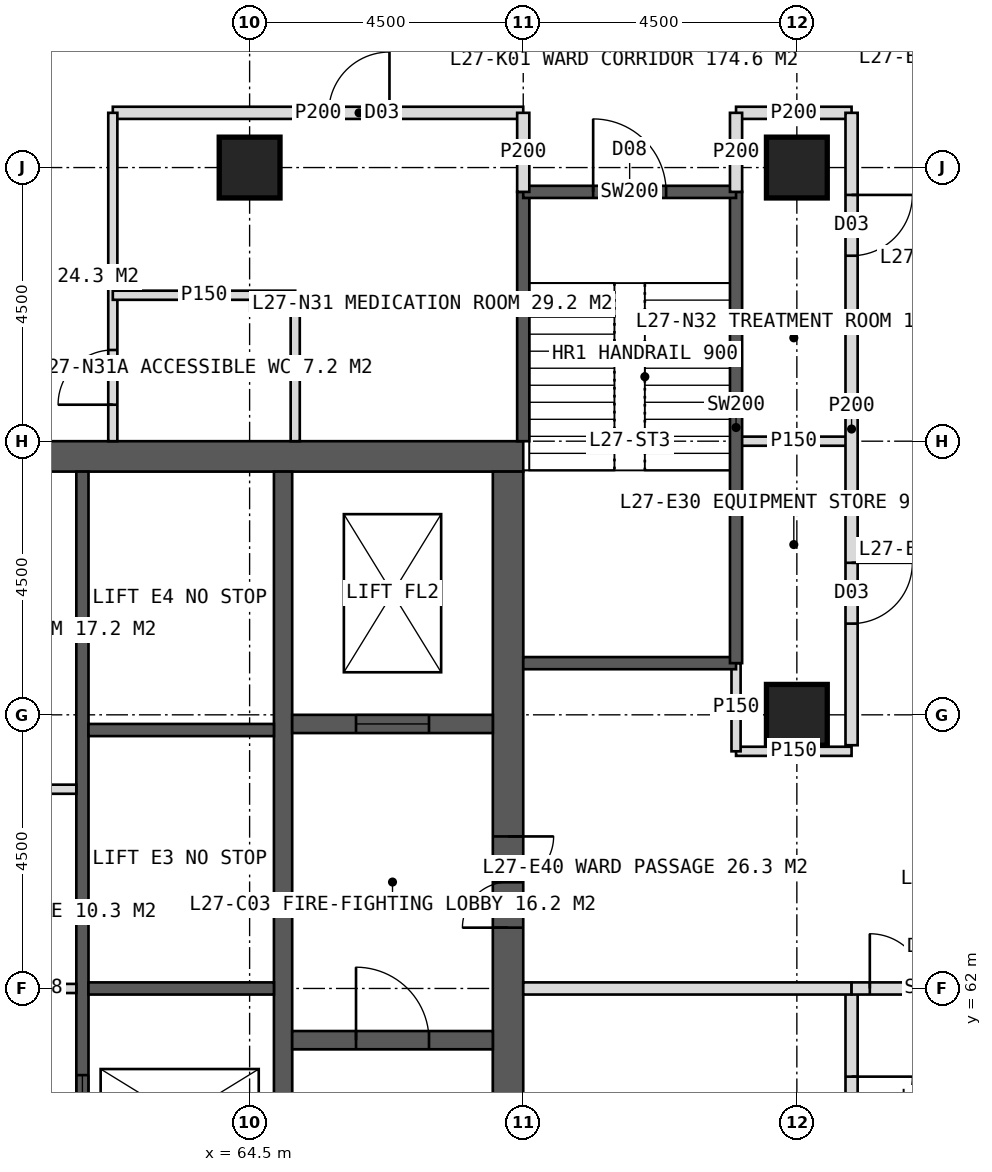
"""IFC4 building model, lengths in metres.
Left out: names, types, materials, properties, quantities, classifications, styles, units other than length and angle.
Written with IfcOpenShell. Run it as: python <this file> out.ifc"""

import sys

from ifc_helpers import new_model, si_unit, direction, frame, frame_2d, origin, origin_2d, place, context, subcontext, project, spatial, rectangle, hollow_rectangle, extrude, element, fill, save


model = new_model("IFC4")
c1 = context("Model", 3, precision=1e-05, world=origin(), true_north=direction((0.0, 1.0)))
c2 = subcontext(c1, "Body", "Model", "MODEL_VIEW")
j1 = project(units=[si_unit("LENGTHUNIT", "METRE"), si_unit("PLANEANGLEUNIT", "RADIAN")], contexts=[c1])
p1 = place(None, origin())
s1 = spatial("IfcSite", under=j1, at=p1, CompositionType="ELEMENT")
p2 = place(p1, origin())
s2 = spatial("IfcBuilding", under=s1, at=p2, CompositionType="ELEMENT")
p3 = place(p2, frame((0.0, 0.0, 116.0)))
s3 = spatial("IfcBuildingStorey", under=s2, at=p3, CompositionType="ELEMENT", Elevation=116.0)
p4 = place(p3, frame((51.0, 70.75, 0.0), z_axis=(0.0, 0.0, 1.0), x_axis=(1.0, 0.0, 0.0)))
e1 = element("IfcWall", 1, at=p4, inside=s3, PredefinedType="SHEAR", context=c2, shape_type="SweptSolid", body=[
    extrude(rectangle(XDim=18.0, YDim=0.5, at=frame_2d((9.0, 0.0))), origin(), (0.0, 0.0, 1.0), 4.0),
])
p5 = place(p4, frame((8.1, 0.0, 0.0)))
e2 = element("IfcOpeningElement", 2, at=p5, cuts=e1, PredefinedType="OPENING", context=c2, shape_type="SweptSolid", body=[
    extrude(rectangle(XDim=1.8, YDim=2.2, at=frame_2d((0.9, 1.1))), frame((0.0, 0.26, 0.0), z_axis=(0.0, -1.0, 0.0), x_axis=(1.0, 0.0, 0.0)), (0.0, 0.0, 1.0), 0.52),
])
p6 = place(p3, frame((68.75, 53.5, 0.0), z_axis=(0.0, 0.0, 1.0), x_axis=(0.0, 1.0, 0.0)))
e3 = element("IfcWall", 3, at=p6, inside=s3, PredefinedType="SHEAR", context=c2, shape_type="SweptSolid", body=[
    extrude(rectangle(XDim=17.0, YDim=0.5, at=frame_2d((8.5, 0.0))), origin(), (0.0, 0.0, 1.0), 4.0),
])
p7 = place(p6, frame((9.5, 0.0, 0.0)))
e4 = element("IfcOpeningElement", 4, at=p7, cuts=e3, PredefinedType="OPENING", context=c2, shape_type="SweptSolid", body=[
    extrude(rectangle(XDim=1.5, YDim=2.2, at=frame_2d((0.75, 1.1))), frame((0.0, 0.26, 0.0), z_axis=(0.0, -1.0, 0.0), x_axis=(1.0, 0.0, 0.0)), (0.0, 0.0, 1.0), 0.52),
])
p8 = place(p3, frame((65.05, 53.5, 0.0), z_axis=(0.0, 0.0, 1.0), x_axis=(0.0, 1.0, 0.0)))
e5 = element("IfcWall", 5, at=p8, inside=s3, PredefinedType="SHEAR", context=c2, shape_type="SweptSolid", body=[
    extrude(rectangle(XDim=17.0, YDim=0.3, at=frame_2d((8.5, 0.0))), origin(), (0.0, 0.0, 1.0), 4.0),
])
p9 = place(p3, frame((61.75, 53.5, 0.0), z_axis=(0.0, 0.0, 1.0), x_axis=(0.0, 1.0, 0.0)))
e6 = element("IfcWall", 6, at=p9, inside=s3, PredefinedType="SHEAR", context=c2, shape_type="SweptSolid", body=[
    extrude(rectangle(XDim=17.0, YDim=0.2, at=frame_2d((8.5, 0.0))), origin(), (0.0, 0.0, 1.0), 4.0),
])
p10 = place(p9, frame((1.375, 0.0, 0.0)))
e7 = element("IfcOpeningElement", 7, at=p10, cuts=e6, PredefinedType="OPENING", context=c2, shape_type="SweptSolid", body=[
    extrude(rectangle(XDim=1.4, YDim=2.2, at=frame_2d((0.7, 1.1))), frame((0.0, 0.11, 0.0), z_axis=(0.0, -1.0, 0.0), x_axis=(1.0, 0.0, 0.0)), (0.0, 0.0, 1.0), 0.22),
])
p11 = place(p9, frame((5.675, 0.0, 0.0)))
e8 = element("IfcOpeningElement", 8, at=p11, cuts=e6, PredefinedType="OPENING", context=c2, shape_type="SweptSolid", body=[
    extrude(rectangle(XDim=1.4, YDim=2.2, at=frame_2d((0.7, 1.1))), frame((0.0, 0.11, 0.0), z_axis=(0.0, -1.0, 0.0), x_axis=(1.0, 0.0, 0.0)), (0.0, 0.0, 1.0), 0.22),
])
for number, where, z_axis, x_axis in (
    (9, (61.85, 62.0, 0.0), (0.0, 0.0, 1.0), (1.0, 0.0, 0.0)),
    (10, (61.85, 66.25, 0.0), (0.0, 0.0, 1.0), (1.0, 0.0, 0.0)),
):
    element("IfcWall", number, at=place(p3, frame(where, z_axis=z_axis, x_axis=x_axis)), inside=s3, PredefinedType="SHEAR", context=c2, shape_type="SweptSolid", body=[
        extrude(rectangle(XDim=3.05, YDim=0.2, at=frame_2d((1.525, 0.0))), origin(), (0.0, 0.0, 1.0), 4.0),
    ])
p12 = place(p3, frame((65.2, 61.15, 0.0), z_axis=(0.0, 0.0, 1.0), x_axis=(1.0, 0.0, 0.0)))
e11 = element("IfcWall", 11, at=p12, inside=s3, PredefinedType="SHEAR", context=c2, shape_type="SweptSolid", body=[
    extrude(rectangle(XDim=3.3, YDim=0.3, at=frame_2d((1.65, 0.0))), origin(), (0.0, 0.0, 1.0), 4.0),
])
p13 = place(p12, frame((1.05, 0.0, 0.0)))
e12 = element("IfcOpeningElement", 12, at=p13, cuts=e11, PredefinedType="OPENING", context=c2, shape_type="SweptSolid", body=[
    extrude(rectangle(XDim=1.2, YDim=2.1, at=frame_2d((0.6, 1.05))), frame((0.0, 0.16, 0.0), z_axis=(0.0, -1.0, 0.0), x_axis=(1.0, 0.0, 0.0)), (0.0, 0.0, 1.0), 0.32),
])
p14 = place(p3, frame((65.2, 66.35, 0.0), z_axis=(0.0, 0.0, 1.0), x_axis=(1.0, 0.0, 0.0)))
e13 = element("IfcWall", 13, at=p14, inside=s3, PredefinedType="SHEAR", context=c2, shape_type="SweptSolid", body=[
    extrude(rectangle(XDim=3.3, YDim=0.3, at=frame_2d((1.65, 0.0))), origin(), (0.0, 0.0, 1.0), 4.0),
])
p15 = place(p14, frame((1.05, 0.0, 0.0)))
e14 = element("IfcOpeningElement", 14, at=p15, cuts=e13, PredefinedType="OPENING", context=c2, shape_type="SweptSolid", body=[
    extrude(rectangle(XDim=1.2, YDim=2.2, at=frame_2d((0.6, 1.1))), frame((0.0, 0.16, 0.0), z_axis=(0.0, -1.0, 0.0), x_axis=(1.0, 0.0, 0.0)), (0.0, 0.0, 1.0), 0.32),
])
for number, where, z_axis, x_axis in (
    (15, (73.5, 75.5, 0.0), (0.0, 0.0, 1.0), (1.0, 0.0, 0.0)),
    (16, (64.5, 75.5, 0.0), (0.0, 0.0, 1.0), (1.0, 0.0, 0.0)),
    (17, (73.5, 66.5, 0.0), (0.0, 0.0, 1.0), (1.0, 0.0, 0.0)),
):
    element("IfcColumn", number, at=place(p3, frame(where, z_axis=z_axis, x_axis=x_axis)), inside=s3, PredefinedType="COLUMN", context=c2, shape_type="SweptSolid", body=[
        extrude(hollow_rectangle(XDim=1.0, YDim=1.0, WallThickness=0.1, at=origin_2d()), origin(), (0.0, 0.0, 1.0), 4.0),
    ])
p16 = place(p3, frame((62.25, 76.4, 0.0), z_axis=(0.0, 0.0, 1.0), x_axis=(1.0, 0.0, 0.0)))
e18 = element("IfcWall", 18, at=p16, inside=s3, PredefinedType="PARTITIONING", context=c2, shape_type="SweptSolid", body=[
    extrude(rectangle(XDim=6.75, YDim=0.2, at=frame_2d((3.375, 0.0))), origin(), (0.0, 0.0, 1.0), 3.75),
])
p17 = place(p16, frame((3.55, 0.0, 0.0)))
e19 = element("IfcOpeningElement", 19, at=p17, cuts=e18, PredefinedType="OPENING", context=c2, shape_type="SweptSolid", body=[
    extrude(rectangle(XDim=1.0, YDim=2.1, at=frame_2d((0.5, 1.05))), frame((0.0, 0.11, 0.0), z_axis=(0.0, -1.0, 0.0), x_axis=(1.0, 0.0, 0.0)), (0.0, 0.0, 1.0), 0.22),
])
p18 = place(p3, frame((72.5, 76.4, 0.0), z_axis=(0.0, 0.0, 1.0), x_axis=(1.0, 0.0, 0.0)))
e20 = element("IfcWall", 20, at=p18, inside=s3, PredefinedType="PARTITIONING", context=c2, shape_type="SweptSolid", body=[
    extrude(rectangle(XDim=1.9, YDim=0.2, at=frame_2d((0.95, 0.0))), origin(), (0.0, 0.0, 1.0), 3.75),
])
p19 = place(p3, frame((62.25, 71.0, 0.0), z_axis=(0.0, 0.0, 1.0), x_axis=(0.0, 1.0, 0.0)))
e21 = element("IfcWall", 21, at=p19, inside=s3, PredefinedType="PARTITIONING", context=c2, shape_type="SweptSolid", body=[
    extrude(rectangle(XDim=5.4, YDim=0.15, at=frame_2d((2.7, 0.0))), origin(), (0.0, 0.0, 1.0), 3.75),
])
p20 = place(p19, frame((0.6, 0.0, 0.0)))
e22 = element("IfcOpeningElement", 22, at=p20, cuts=e21, PredefinedType="OPENING", context=c2, shape_type="SweptSolid", body=[
    extrude(rectangle(XDim=0.9, YDim=2.1, at=frame_2d((0.45, 1.05))), frame((0.0, 0.085, 0.0), z_axis=(0.0, -1.0, 0.0), x_axis=(1.0, 0.0, 0.0)), (0.0, 0.0, 1.0), 0.17),
])
p21 = place(p3, frame((62.25, 73.4, 0.0), z_axis=(0.0, 0.0, 1.0), x_axis=(1.0, 0.0, 0.0)))
e23 = element("IfcWall", 23, at=p21, inside=s3, PredefinedType="PARTITIONING", context=c2, shape_type="SweptSolid", body=[
    extrude(rectangle(XDim=3.0, YDim=0.15, at=frame_2d((1.5, 0.0))), origin(), (0.0, 0.0, 1.0), 3.75),
])
p22 = place(p3, frame((65.25, 71.0, 0.0), z_axis=(0.0, 0.0, 1.0), x_axis=(0.0, 1.0, 0.0)))
e24 = element("IfcWall", 24, at=p22, inside=s3, PredefinedType="PARTITIONING", context=c2, shape_type="SweptSolid", body=[
    extrude(rectangle(XDim=2.4, YDim=0.15, at=frame_2d((1.2, 0.0))), origin(), (0.0, 0.0, 1.0), 3.75),
])
p23 = place(p3, frame((72.5, 71.0, 0.0), z_axis=(0.0, 0.0, 1.0), x_axis=(1.0, 0.0, 0.0)))
e25 = element("IfcWall", 25, at=p23, inside=s3, PredefinedType="PARTITIONING", context=c2, shape_type="SweptSolid", body=[
    extrude(rectangle(XDim=1.9, YDim=0.15, at=frame_2d((0.95, 0.0))), origin(), (0.0, 0.0, 1.0), 3.75),
])
p24 = place(p3, frame((74.4, 76.4, 0.0), z_axis=(0.0, 0.0, 1.0), x_axis=(0.0, -1.0, 0.0)))
e26 = element("IfcWall", 26, at=p24, inside=s3, PredefinedType="PARTITIONING", context=c2, shape_type="SweptSolid", body=[
    extrude(rectangle(XDim=10.4, YDim=0.2, at=frame_2d((5.2, 0.0))), origin(), (0.0, 0.0, 1.0), 3.75),
])
p25 = place(p24, frame((1.35, 0.0, 0.0)))
e27 = element("IfcOpeningElement", 27, at=p25, cuts=e26, PredefinedType="OPENING", context=c2, shape_type="SweptSolid", body=[
    extrude(rectangle(XDim=1.0, YDim=2.1, at=frame_2d((0.5, 1.05))), frame((0.0, 0.11, 0.0), z_axis=(0.0, -1.0, 0.0), x_axis=(1.0, 0.0, 0.0)), (0.0, 0.0, 1.0), 0.22),
])
p26 = place(p24, frame((7.4, 0.0, 0.0)))
e28 = element("IfcOpeningElement", 28, at=p26, cuts=e26, PredefinedType="OPENING", context=c2, shape_type="SweptSolid", body=[
    extrude(rectangle(XDim=1.0, YDim=2.1, at=frame_2d((0.5, 1.05))), frame((0.0, 0.11, 0.0), z_axis=(0.0, -1.0, 0.0), x_axis=(1.0, 0.0, 0.0)), (0.0, 0.0, 1.0), 0.22),
])
p27 = place(p3, frame((74.4, 62.0, 0.0), z_axis=(0.0, 0.0, 1.0), x_axis=(0.0, -1.0, 0.0)))
e29 = element("IfcWall", 29, at=p27, inside=s3, PredefinedType="PARTITIONING", context=c2, shape_type="SweptSolid", body=[
    extrude(rectangle(XDim=14.4, YDim=0.2, at=frame_2d((7.2, 0.0))), origin(), (0.0, 0.0, 1.0), 3.75),
])
p28 = place(p27, frame((1.45, 0.0, 0.0)))
e30 = element("IfcOpeningElement", 30, at=p28, cuts=e29, PredefinedType="OPENING", context=c2, shape_type="SweptSolid", body=[
    extrude(rectangle(XDim=1.0, YDim=2.1, at=frame_2d((0.5, 1.05))), frame((0.0, 0.11, 0.0), z_axis=(0.0, -1.0, 0.0), x_axis=(1.0, 0.0, 0.0)), (0.0, 0.0, 1.0), 0.22),
])
p29 = place(p27, frame((11.2, 0.0, 0.0)))
e31 = element("IfcOpeningElement", 31, at=p29, cuts=e29, PredefinedType="OPENING", context=c2, shape_type="SweptSolid", body=[
    extrude(rectangle(XDim=1.0, YDim=2.1, at=frame_2d((0.5, 1.05))), frame((0.0, 0.11, 0.0), z_axis=(0.0, -1.0, 0.0), x_axis=(1.0, 0.0, 0.0)), (0.0, 0.0, 1.0), 0.22),
])
p30 = place(p3, frame((72.5, 65.9, 0.0), z_axis=(0.0, 0.0, 1.0), x_axis=(1.0, 0.0, 0.0)))
e32 = element("IfcWall", 32, at=p30, inside=s3, PredefinedType="PARTITIONING", context=c2, shape_type="SweptSolid", body=[
    extrude(rectangle(XDim=1.9, YDim=0.15, at=frame_2d((0.95, 0.0))), origin(), (0.0, 0.0, 1.0), 3.75),
])
p31 = place(p3, frame((69.0, 62.0, 0.0), z_axis=(0.0, 0.0, 1.0), x_axis=(1.0, 0.0, 0.0)))
e33 = element("IfcWall", 33, at=p31, inside=s3, PredefinedType="SOLIDWALL", context=c2, shape_type="SweptSolid", body=[
    extrude(rectangle(XDim=5.4, YDim=0.2, at=frame_2d((2.7, 0.0))), origin(), (0.0, 0.0, 1.0), 2.95),
])
p32 = place(p3, frame((74.4, 62.0, 0.0), z_axis=(0.0, 0.0, 1.0), x_axis=(1.0, 0.0, 0.0)))
e34 = element("IfcWall", 34, at=p32, inside=s3, PredefinedType="SOLIDWALL", context=c2, shape_type="SweptSolid", body=[
    extrude(rectangle(XDim=2.7, YDim=0.2, at=frame_2d((1.35, 0.0))), origin(), (0.0, 0.0, 1.0), 2.95),
])
p33 = place(p32, frame((0.3, 0.0, 0.0)))
e35 = element("IfcOpeningElement", 35, at=p33, cuts=e34, PredefinedType="OPENING", context=c2, shape_type="SweptSolid", body=[
    extrude(rectangle(XDim=1.8, YDim=2.2, at=frame_2d((0.9, 1.1))), frame((0.0, 0.11, 0.0), z_axis=(0.0, -1.0, 0.0), x_axis=(1.0, 0.0, 0.0)), (0.0, 0.0, 1.0), 0.22),
])
p34 = place(p3, frame((58.35, 62.0, 0.0), z_axis=(0.0, 0.0, 1.0), x_axis=(1.0, 0.0, 0.0)))
e36 = element("IfcWall", 36, at=p34, inside=s3, PredefinedType="PARTITIONING", context=c2, shape_type="SweptSolid", body=[
    extrude(rectangle(XDim=3.3, YDim=0.15, at=frame_2d((1.65, 0.0))), origin(), (0.0, 0.0, 1.0), 3.75),
])
p35 = place(p34, frame((1.15, 0.0, 0.0)))
e37 = element("IfcOpeningElement", 37, at=p35, cuts=e36, PredefinedType="OPENING", context=c2, shape_type="SweptSolid", body=[
    extrude(rectangle(XDim=1.0, YDim=2.1, at=frame_2d((0.5, 1.05))), frame((0.0, 0.085, 0.0), z_axis=(0.0, -1.0, 0.0), x_axis=(1.0, 0.0, 0.0)), (0.0, 0.0, 1.0), 0.17),
])
p36 = place(p3, frame((58.35, 65.277, 0.0), z_axis=(0.0, 0.0, 1.0), x_axis=(1.0, 0.0, 0.0)))
e38 = element("IfcWall", 38, at=p36, inside=s3, PredefinedType="PARTITIONING", context=c2, shape_type="SweptSolid", body=[
    extrude(rectangle(XDim=3.3, YDim=0.15, at=frame_2d((1.65, 0.0))), origin(), (0.0, 0.0, 1.0), 3.75),
])
p37 = place(p3, frame((72.5, 65.9, 0.0), z_axis=(0.0, 0.0, 1.0), x_axis=(0.0, 1.0, 0.0)))
e39 = element("IfcWall", 39, at=p37, inside=s3, PredefinedType="PARTITIONING", context=c2, shape_type="SweptSolid", body=[
    extrude(rectangle(XDim=1.45, YDim=0.15, at=frame_2d((0.725, 0.0))), origin(), (0.0, 0.0, 1.0), 3.75),
])
p38 = place(p3, frame((69.0, 71.0, 0.0), z_axis=(0.0, 0.0, 1.0), x_axis=(0.0, 1.0, 0.0)))
e40 = element("IfcWall", 40, at=p38, inside=s3, PredefinedType="SOLIDWALL", context=c2, shape_type="SweptSolid", body=[
    extrude(rectangle(XDim=4.1, YDim=0.2, at=frame_2d((2.05, 0.0))), origin(), (0.0, 0.0, 1.0), 3.75),
])
p39 = place(p3, frame((69.0, 67.35, 0.0), z_axis=(0.0, 0.0, 1.0), x_axis=(1.0, 0.0, 0.0)))
e41 = element("IfcWall", 41, at=p39, inside=s3, PredefinedType="SOLIDWALL", context=c2, shape_type="SweptSolid", body=[
    extrude(rectangle(XDim=3.5, YDim=0.2, at=frame_2d((1.75, 0.0))), origin(), (0.0, 0.0, 1.0), 3.75),
])
p40 = place(p3, frame((72.5, 67.35, 0.0), z_axis=(0.0, 0.0, 1.0), x_axis=(0.0, 1.0, 0.0)))
e42 = element("IfcWall", 42, at=p40, inside=s3, PredefinedType="SOLIDWALL", context=c2, shape_type="SweptSolid", body=[
    extrude(rectangle(XDim=7.75, YDim=0.2, at=frame_2d((3.875, 0.0))), origin(), (0.0, 0.0, 1.0), 3.75),
])
p41 = place(p3, frame((69.0, 75.1, 0.0), z_axis=(0.0, 0.0, 1.0), x_axis=(1.0, 0.0, 0.0)))
e43 = element("IfcWall", 43, at=p41, inside=s3, PredefinedType="SOLIDWALL", context=c2, shape_type="SweptSolid", body=[
    extrude(rectangle(XDim=3.5, YDim=0.2, at=frame_2d((1.75, 0.0))), origin(), (0.0, 0.0, 1.0), 3.75),
])
p42 = place(p41, frame((1.15, 0.0, 0.0)))
e44 = element("IfcOpeningElement", 44, at=p42, cuts=e43, PredefinedType="OPENING", context=c2, shape_type="SweptSolid", body=[
    extrude(rectangle(XDim=1.2, YDim=2.1, at=frame_2d((0.6, 1.05))), frame((0.0, 0.11, 0.0), z_axis=(0.0, -1.0, 0.0), x_axis=(1.0, 0.0, 0.0)), (0.0, 0.0, 1.0), 0.22),
])
for number, where, z_axis, x_axis in (
    (45, (69.0, 75.1, 0.0), (0.0, 0.0, 1.0), (0.0, 1.0, 0.0)),
    (46, (72.5, 75.1, 0.0), (0.0, 0.0, 1.0), (0.0, 1.0, 0.0)),
):
    element("IfcWall", number, at=place(p3, frame(where, z_axis=z_axis, x_axis=x_axis)), inside=s3, PredefinedType="PARTITIONING", context=c2, shape_type="SweptSolid", body=[
        extrude(rectangle(XDim=1.3, YDim=0.2, at=frame_2d((0.65, 0.0))), origin(), (0.0, 0.0, 1.0), 3.75),
    ])
p43 = place(p20, origin())
e47 = element("IfcDoor", 47, at=p43, inside=s3, OperationType="SINGLE_SWING_LEFT", PredefinedType="DOOR", context=c2, shape_type="SweptSolid", body=[
    extrude(rectangle(XDim=0.9, YDim=2.1, at=frame_2d((0.45, 1.05))), frame((0.0, 0.025, 0.0), z_axis=(0.0, -1.0, 0.0), x_axis=(1.0, 0.0, 0.0)), (0.0, 0.0, 1.0), 0.05),
])
fill(e22, e47)
p44 = place(p17, origin())
e48 = element("IfcDoor", 48, at=p44, inside=s3, OperationType="SINGLE_SWING_RIGHT", PredefinedType="DOOR", context=c2, shape_type="SweptSolid", body=[
    extrude(rectangle(XDim=1.0, YDim=2.1, at=frame_2d((0.5, 1.05))), frame((0.0, 0.025, 0.0), z_axis=(0.0, -1.0, 0.0), x_axis=(1.0, 0.0, 0.0)), (0.0, 0.0, 1.0), 0.05),
])
fill(e19, e48)
p45 = place(p25, origin())
e49 = element("IfcDoor", 49, at=p45, inside=s3, OperationType="SINGLE_SWING_LEFT", PredefinedType="DOOR", context=c2, shape_type="SweptSolid", body=[
    extrude(rectangle(XDim=1.0, YDim=2.1, at=frame_2d((0.5, 1.05))), frame((0.0, 0.025, 0.0), z_axis=(0.0, -1.0, 0.0), x_axis=(1.0, 0.0, 0.0)), (0.0, 0.0, 1.0), 0.05),
])
fill(e27, e49)
p46 = place(p26, origin())
e50 = element("IfcDoor", 50, at=p46, inside=s3, OperationType="SINGLE_SWING_LEFT", PredefinedType="DOOR", context=c2, shape_type="SweptSolid", body=[
    extrude(rectangle(XDim=1.0, YDim=2.1, at=frame_2d((0.5, 1.05))), frame((0.0, 0.025, 0.0), z_axis=(0.0, -1.0, 0.0), x_axis=(1.0, 0.0, 0.0)), (0.0, 0.0, 1.0), 0.05),
])
fill(e28, e50)
p47 = place(p28, origin())
e51 = element("IfcDoor", 51, at=p47, inside=s3, OperationType="SINGLE_SWING_LEFT", PredefinedType="DOOR", context=c2, shape_type="SweptSolid", body=[
    extrude(rectangle(XDim=1.0, YDim=2.1, at=frame_2d((0.5, 1.05))), frame((0.0, 0.025, 0.0), z_axis=(0.0, -1.0, 0.0), x_axis=(1.0, 0.0, 0.0)), (0.0, 0.0, 1.0), 0.05),
])
fill(e30, e51)
p48 = place(p33, origin())
e52 = element("IfcDoor", 52, at=p48, inside=s3, OperationType="DOUBLE_DOOR_DOUBLE_SWING", PredefinedType="DOOR", context=c2, shape_type="SweptSolid", body=[
    extrude(rectangle(XDim=1.8, YDim=2.2, at=frame_2d((0.9, 1.1))), frame((0.0, 0.025, 0.0), z_axis=(0.0, -1.0, 0.0), x_axis=(1.0, 0.0, 0.0)), (0.0, 0.0, 1.0), 0.05),
])
fill(e35, e52)
p49 = place(p7, origin())
e53 = element("IfcDoor", 53, at=p49, inside=s3, OperationType="DOUBLE_DOOR_SINGLE_SWING", PredefinedType="DOOR", context=c2, shape_type="SweptSolid", body=[
    extrude(rectangle(XDim=1.5, YDim=2.2, at=frame_2d((0.75, 1.1))), frame((0.0, 0.025, 0.0), z_axis=(0.0, -1.0, 0.0), x_axis=(1.0, 0.0, 0.0)), (0.0, 0.0, 1.0), 0.05),
])
fill(e4, e53)
p50 = place(p13, origin())
e54 = element("IfcDoor", 54, at=p50, inside=s3, OperationType="SINGLE_SWING_LEFT", PredefinedType="DOOR", context=c2, shape_type="SweptSolid", body=[
    extrude(rectangle(XDim=1.2, YDim=2.1, at=frame_2d((0.6, 1.05))), frame((0.0, 0.025, 0.0), z_axis=(0.0, -1.0, 0.0), x_axis=(1.0, 0.0, 0.0)), (0.0, 0.0, 1.0), 0.05),
])
fill(e12, e54)
p51 = place(p15, origin())
e55 = element("IfcDoor", 55, at=p51, inside=s3, OperationType="SLIDING_TO_LEFT", PredefinedType="DOOR", context=c2, shape_type="SweptSolid", body=[
    extrude(rectangle(XDim=1.2, YDim=2.2, at=frame_2d((0.6, 1.1))), frame((0.0, 0.025, 0.0), z_axis=(0.0, -1.0, 0.0), x_axis=(1.0, 0.0, 0.0)), (0.0, 0.0, 1.0), 0.05),
])
fill(e14, e55)
p52 = place(p11, origin())
e56 = element("IfcDoor", 56, at=p52, inside=s3, OperationType="SLIDING_TO_LEFT", PredefinedType="DOOR", context=c2, shape_type="SweptSolid", body=[
    extrude(rectangle(XDim=1.4, YDim=2.2, at=frame_2d((0.7, 1.1))), frame((0.0, 0.025, 0.0), z_axis=(0.0, -1.0, 0.0), x_axis=(1.0, 0.0, 0.0)), (0.0, 0.0, 1.0), 0.05),
])
fill(e8, e56)
p53 = place(p42, origin())
e57 = element("IfcDoor", 57, at=p53, inside=s3, OperationType="SINGLE_SWING_LEFT", PredefinedType="DOOR", context=c2, shape_type="SweptSolid", body=[
    extrude(rectangle(XDim=1.2, YDim=2.1, at=frame_2d((0.6, 1.05))), frame((0.0, 0.025, 0.0), z_axis=(0.0, -1.0, 0.0), x_axis=(1.0, 0.0, 0.0)), (0.0, 0.0, 1.0), 0.05),
])
fill(e44, e57)
save(model, sys.argv[1])
